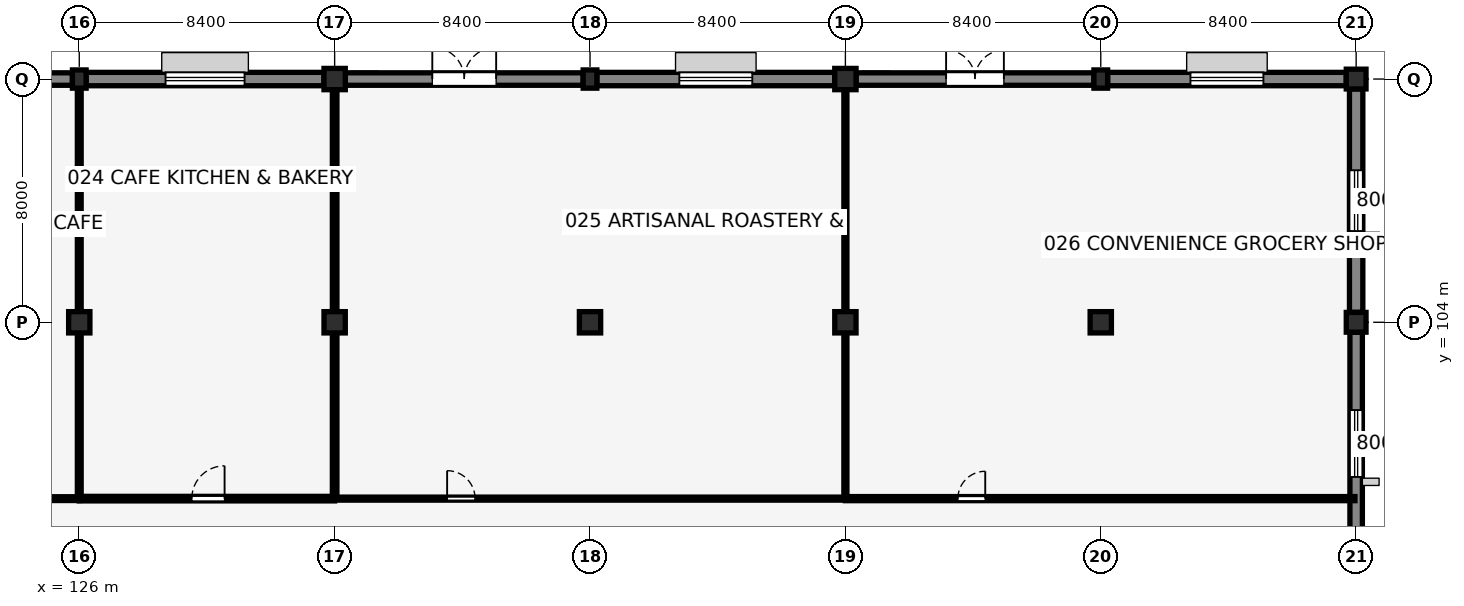
"""IFC4 building model, lengths in metres.
Left out: names, types, materials, properties, quantities, classifications, styles, units other than length and angle.
Written with IfcOpenShell. Run it as: python <this file> out.ifc"""

import sys

from ifc_helpers import new_model, si_unit, direction, frame, frame_2d, origin, origin_2d, place, context, subcontext, project, spatial, rectangle, extrude, element, fill, save


model = new_model("IFC4")
c1 = context("Model", 3, precision=1e-05, world=origin(), true_north=direction((0.0, 1.0)))
c2 = subcontext(c1, "Body", "Model", "MODEL_VIEW")
j1 = project(units=[si_unit("LENGTHUNIT", "METRE"), si_unit("PLANEANGLEUNIT", "RADIAN")], contexts=[c1])
p1 = place(None, origin())
s1 = spatial("IfcSite", under=j1, at=p1, CompositionType="ELEMENT")
p2 = place(p1, origin())
s2 = spatial("IfcBuilding", under=s1, at=p2, CompositionType="ELEMENT")
p3 = place(p2, origin())
s3 = spatial("IfcBuildingStorey", under=s2, at=p3, CompositionType="ELEMENT", Elevation=0.0)
p4 = place(p3, frame((126.0, 104.0, 0.0), z_axis=(0.0, 0.0, 1.0), x_axis=(1.0, 0.0, 0.0)))
e1 = element("IfcColumn", 1, at=p4, inside=s3, PredefinedType="COLUMN", context=c2, shape_type="SweptSolid", body=[
    extrude(rectangle(XDim=0.7, YDim=0.7, at=origin_2d()), origin(), (0.0, 0.0, 1.0), 5.15),
])
p5 = place(p3, frame((126.0, 112.0, 0.0), z_axis=(0.0, 0.0, 1.0), x_axis=(1.0, 0.0, 0.0)))
e2 = element("IfcColumn", 2, at=p5, inside=s3, PredefinedType="PILASTER", context=c2, shape_type="SweptSolid", body=[
    extrude(rectangle(XDim=0.45, YDim=0.6, at=origin_2d()), origin(), (0.0, 0.0, 1.0), 5.15),
])
for number, where, z_axis, x_axis in (
    (3, (134.4, 104.0, 0.0), (0.0, 0.0, 1.0), (1.0, 0.0, 0.0)),
    (4, (134.4, 112.0, 0.0), (0.0, 0.0, 1.0), (1.0, 0.0, 0.0)),
    (5, (142.8, 104.0, 0.0), (0.0, 0.0, 1.0), (1.0, 0.0, 0.0)),
):
    element("IfcColumn", number, at=place(p3, frame(where, z_axis=z_axis, x_axis=x_axis)), inside=s3, PredefinedType="COLUMN", context=c2, shape_type="SweptSolid", body=[
        extrude(rectangle(XDim=0.7, YDim=0.7, at=origin_2d()), origin(), (0.0, 0.0, 1.0), 5.15),
    ])
p6 = place(p3, frame((142.8, 112.0, 0.0), z_axis=(0.0, 0.0, 1.0), x_axis=(1.0, 0.0, 0.0)))
e6 = element("IfcColumn", 6, at=p6, inside=s3, PredefinedType="PILASTER", context=c2, shape_type="SweptSolid", body=[
    extrude(rectangle(XDim=0.45, YDim=0.6, at=origin_2d()), origin(), (0.0, 0.0, 1.0), 5.15),
])
for number, where, z_axis, x_axis in (
    (7, (151.2, 104.0, 0.0), (0.0, 0.0, 1.0), (1.0, 0.0, 0.0)),
    (8, (151.2, 112.0, 0.0), (0.0, 0.0, 1.0), (1.0, 0.0, 0.0)),
    (9, (159.6, 104.0, 0.0), (0.0, 0.0, 1.0), (1.0, 0.0, 0.0)),
):
    element("IfcColumn", number, at=place(p3, frame(where, z_axis=z_axis, x_axis=x_axis)), inside=s3, PredefinedType="COLUMN", context=c2, shape_type="SweptSolid", body=[
        extrude(rectangle(XDim=0.7, YDim=0.7, at=origin_2d()), origin(), (0.0, 0.0, 1.0), 5.15),
    ])
p7 = place(p3, frame((159.6, 112.0, 0.0), z_axis=(0.0, 0.0, 1.0), x_axis=(1.0, 0.0, 0.0)))
e10 = element("IfcColumn", 10, at=p7, inside=s3, PredefinedType="PILASTER", context=c2, shape_type="SweptSolid", body=[
    extrude(rectangle(XDim=0.45, YDim=0.6, at=origin_2d()), origin(), (0.0, 0.0, 1.0), 5.15),
])
for number, where, z_axis, x_axis in (
    (11, (168.0, 104.0, 0.0), (0.0, 0.0, 1.0), (1.0, 0.0, 0.0)),
    (12, (168.0, 112.0, 0.0), (0.0, 0.0, 1.0), (1.0, 0.0, 0.0)),
):
    element("IfcColumn", number, at=place(p3, frame(where, z_axis=z_axis, x_axis=x_axis)), inside=s3, PredefinedType="COLUMN", context=c2, shape_type="SweptSolid", body=[
        extrude(rectangle(XDim=0.65, YDim=0.65, at=origin_2d()), origin(), (0.0, 0.0, 1.0), 5.15),
    ])
p8 = place(p3, frame((117.95, 112.0, 0.0), z_axis=(0.0, 0.0, 1.0), x_axis=(1.0, 0.0, 0.0)))
e13 = element("IfcWall", 13, at=p8, inside=s3, PredefinedType="SOLIDWALL", context=c2, shape_type="SweptSolid", body=[
    extrude(rectangle(XDim=7.825, YDim=0.41, at=frame_2d((3.913, 0.0))), origin(), (0.0, 0.0, 1.0), 4.74),
])
p9 = place(p8, frame((2.512, 0.0, 0.9), z_axis=(0.0, 0.0, 1.0), x_axis=(1.0, 0.0, 0.0)))
e14 = element("IfcOpeningElement", 14, at=p9, cuts=e13, PredefinedType="OPENING", context=c2, shape_type="SweptSolid", body=[
    extrude(rectangle(XDim=2.8, YDim=1.6, at=frame_2d((1.4, 0.8))), frame((0.0, 0.215, 0.0), z_axis=(0.0, -1.0, 0.0), x_axis=(1.0, 0.0, 0.0)), (0.0, 0.0, 1.0), 0.43),
])
p10 = place(p3, frame((126.225, 112.0, 0.0), z_axis=(0.0, 0.0, 1.0), x_axis=(1.0, 0.0, 0.0)))
e15 = element("IfcWall", 15, at=p10, inside=s3, PredefinedType="SOLIDWALL", context=c2, shape_type="SweptSolid", body=[
    extrude(rectangle(XDim=7.825, YDim=0.44, at=frame_2d((3.913, 0.0))), origin(), (0.0, 0.0, 1.0), 4.74),
])
p11 = place(p10, frame((2.613, 0.0, 0.9), z_axis=(0.0, 0.0, 1.0), x_axis=(1.0, 0.0, 0.0)))
e16 = element("IfcOpeningElement", 16, at=p11, cuts=e15, PredefinedType="OPENING", context=c2, shape_type="SweptSolid", body=[
    extrude(rectangle(XDim=2.6, YDim=1.8, at=frame_2d((1.3, 0.9))), frame((0.0, 0.23, 0.0), z_axis=(0.0, -1.0, 0.0), x_axis=(1.0, 0.0, 0.0)), (0.0, 0.0, 1.0), 0.46),
])
p12 = place(p3, frame((134.75, 112.0, 0.0), z_axis=(0.0, 0.0, 1.0), x_axis=(1.0, 0.0, 0.0)))
e17 = element("IfcWall", 17, at=p12, inside=s3, PredefinedType="SOLIDWALL", context=c2, shape_type="SweptSolid", body=[
    extrude(rectangle(XDim=7.825, YDim=0.41, at=frame_2d((3.913, 0.0))), origin(), (0.0, 0.0, 1.0), 4.74),
])
p13 = place(p12, frame((2.863, 0.0, 0.0), z_axis=(0.0, 0.0, 1.0), x_axis=(1.0, 0.0, 0.0)))
e18 = element("IfcOpeningElement", 18, at=p13, cuts=e17, PredefinedType="OPENING", context=c2, shape_type="SweptSolid", body=[
    extrude(rectangle(XDim=2.1, YDim=2.45, at=frame_2d((1.05, 1.225))), frame((0.0, 0.215, 0.0), z_axis=(0.0, -1.0, 0.0), x_axis=(1.0, 0.0, 0.0)), (0.0, 0.0, 1.0), 0.43),
])
p14 = place(p3, frame((143.025, 112.0, 0.0), z_axis=(0.0, 0.0, 1.0), x_axis=(1.0, 0.0, 0.0)))
e19 = element("IfcWall", 19, at=p14, inside=s3, PredefinedType="SOLIDWALL", context=c2, shape_type="SweptSolid", body=[
    extrude(rectangle(XDim=7.825, YDim=0.44, at=frame_2d((3.913, 0.0))), origin(), (0.0, 0.0, 1.0), 4.74),
])
p15 = place(p14, frame((2.712, 0.0, 0.9), z_axis=(0.0, 0.0, 1.0), x_axis=(1.0, 0.0, 0.0)))
e20 = element("IfcOpeningElement", 20, at=p15, cuts=e19, PredefinedType="OPENING", context=c2, shape_type="SweptSolid", body=[
    extrude(rectangle(XDim=2.4, YDim=1.75, at=frame_2d((1.2, 0.875))), frame((0.0, 0.23, 0.0), z_axis=(0.0, -1.0, 0.0), x_axis=(1.0, 0.0, 0.0)), (0.0, 0.0, 1.0), 0.46),
])
p16 = place(p3, frame((151.55, 112.0, 0.0), z_axis=(0.0, 0.0, 1.0), x_axis=(1.0, 0.0, 0.0)))
e21 = element("IfcWall", 21, at=p16, inside=s3, PredefinedType="SOLIDWALL", context=c2, shape_type="SweptSolid", body=[
    extrude(rectangle(XDim=7.825, YDim=0.41, at=frame_2d((3.913, 0.0))), origin(), (0.0, 0.0, 1.0), 4.74),
])
p17 = place(p16, frame((2.962, 0.0, 0.0), z_axis=(0.0, 0.0, 1.0), x_axis=(1.0, 0.0, 0.0)))
e22 = element("IfcOpeningElement", 22, at=p17, cuts=e21, PredefinedType="OPENING", context=c2, shape_type="SweptSolid", body=[
    extrude(rectangle(XDim=1.9, YDim=2.35, at=frame_2d((0.95, 1.175))), frame((0.0, 0.215, 0.0), z_axis=(0.0, -1.0, 0.0), x_axis=(1.0, 0.0, 0.0)), (0.0, 0.0, 1.0), 0.43),
])
p18 = place(p3, frame((159.825, 112.0, 0.0), z_axis=(0.0, 0.0, 1.0), x_axis=(1.0, 0.0, 0.0)))
e23 = element("IfcWall", 23, at=p18, inside=s3, PredefinedType="SOLIDWALL", context=c2, shape_type="SweptSolid", body=[
    extrude(rectangle(XDim=7.85, YDim=0.44, at=frame_2d((3.925, 0.0))), origin(), (0.0, 0.0, 1.0), 4.74),
])
p19 = place(p18, frame((2.725, 0.0, 0.9), z_axis=(0.0, 0.0, 1.0), x_axis=(1.0, 0.0, 0.0)))
e24 = element("IfcOpeningElement", 24, at=p19, cuts=e23, PredefinedType="OPENING", context=c2, shape_type="SweptSolid", body=[
    extrude(rectangle(XDim=2.4, YDim=1.5, at=frame_2d((1.2, 0.75))), frame((0.0, 0.23, 0.0), z_axis=(0.0, -1.0, 0.0), x_axis=(1.0, 0.0, 0.0)), (0.0, 0.0, 1.0), 0.46),
])
p20 = place(p3, frame((168.0, 96.35, 0.0), z_axis=(0.0, 0.0, 1.0), x_axis=(0.0, 1.0, 0.0)))
e25 = element("IfcWall", 25, at=p20, inside=s3, PredefinedType="SOLIDWALL", context=c2, shape_type="SweptSolid", body=[
    extrude(rectangle(XDim=7.325, YDim=0.41, at=frame_2d((3.663, 0.0))), origin(), (0.0, 0.0, 1.0), 4.747),
])
p21 = place(p20, frame((2.562, 0.0, 0.9), z_axis=(0.0, 0.0, 1.0), x_axis=(1.0, 0.0, 0.0)))
e26 = element("IfcOpeningElement", 26, at=p21, cuts=e25, PredefinedType="OPENING", context=c2, shape_type="SweptSolid", body=[
    extrude(rectangle(XDim=2.2, YDim=1.5, at=frame_2d((1.1, 0.75))), frame((0.0, 0.215, 0.0), z_axis=(0.0, -1.0, 0.0), x_axis=(1.0, 0.0, 0.0)), (0.0, 0.0, 1.0), 0.43),
])
p22 = place(p3, frame((168.0, 104.325, 0.0), z_axis=(0.0, 0.0, 1.0), x_axis=(0.0, 1.0, 0.0)))
e27 = element("IfcWall", 27, at=p22, inside=s3, PredefinedType="SOLIDWALL", context=c2, shape_type="SweptSolid", body=[
    extrude(rectangle(XDim=7.35, YDim=0.44, at=frame_2d((3.675, 0.0))), origin(), (0.0, 0.0, 1.0), 4.747),
])
p23 = place(p22, frame((2.675, 0.0, 0.9), z_axis=(0.0, 0.0, 1.0), x_axis=(1.0, 0.0, 0.0)))
e28 = element("IfcOpeningElement", 28, at=p23, cuts=e27, PredefinedType="OPENING", context=c2, shape_type="SweptSolid", body=[
    extrude(rectangle(XDim=2.0, YDim=1.5, at=frame_2d((1.0, 0.75))), frame((0.0, 0.23, 0.0), z_axis=(0.0, -1.0, 0.0), x_axis=(1.0, 0.0, 0.0)), (0.0, 0.0, 1.0), 0.46),
])
p24 = place(p3, frame((100.84, 98.2, 0.0), z_axis=(0.0, 0.0, 1.0), x_axis=(1.0, 0.0, 0.0)))
e29 = element("IfcWall", 29, at=p24, inside=s3, PredefinedType="PARTITIONING", context=c2, shape_type="SweptSolid", body=[
    extrude(rectangle(XDim=25.16, YDim=0.125, at=frame_2d((12.58, 0.0))), origin(), (0.0, 0.0, 1.0), 5.15),
])
p25 = place(p24, frame((3.66, 0.0, 0.0), z_axis=(0.0, 0.0, 1.0), x_axis=(1.0, 0.0, 0.0)))
e30 = element("IfcOpeningElement", 30, at=p25, cuts=e29, PredefinedType="OPENING", context=c2, shape_type="SweptSolid", body=[
    extrude(rectangle(XDim=0.98, YDim=2.15, at=frame_2d((0.49, 1.075))), frame((0.0, 0.073, 0.0), z_axis=(0.0, -1.0, 0.0), x_axis=(1.0, 0.0, 0.0)), (0.0, 0.0, 1.0), 0.145),
])
p26 = place(p3, frame((126.0, 98.2, 0.0), z_axis=(0.0, 0.0, 1.0), x_axis=(1.0, 0.0, 0.0)))
e31 = element("IfcWall", 31, at=p26, inside=s3, PredefinedType="PARTITIONING", context=c2, shape_type="SweptSolid", body=[
    extrude(rectangle(XDim=8.4, YDim=0.15, at=frame_2d((4.2, 0.0))), origin(), (0.0, 0.0, 1.0), 5.15),
])
p27 = place(p26, frame((3.7, 0.0, 0.0), z_axis=(0.0, 0.0, 1.0), x_axis=(1.0, 0.0, 0.0)))
e32 = element("IfcOpeningElement", 32, at=p27, cuts=e31, PredefinedType="OPENING", context=c2, shape_type="SweptSolid", body=[
    extrude(rectangle(XDim=1.08, YDim=2.18, at=frame_2d((0.54, 1.09))), frame((0.0, 0.085, 0.0), z_axis=(0.0, -1.0, 0.0), x_axis=(1.0, 0.0, 0.0)), (0.0, 0.0, 1.0), 0.17),
])
p28 = place(p3, frame((134.4, 98.2, 0.0), z_axis=(0.0, 0.0, 1.0), x_axis=(1.0, 0.0, 0.0)))
e33 = element("IfcWall", 33, at=p28, inside=s3, PredefinedType="PARTITIONING", context=c2, shape_type="SweptSolid", body=[
    extrude(rectangle(XDim=16.8, YDim=0.1, at=frame_2d((8.4, 0.0))), origin(), (0.0, 0.0, 1.0), 4.542),
])
p29 = place(p28, frame((3.7, 0.0, 0.0), z_axis=(0.0, 0.0, 1.0), x_axis=(1.0, 0.0, 0.0)))
e34 = element("IfcOpeningElement", 34, at=p29, cuts=e33, PredefinedType="OPENING", context=c2, shape_type="SweptSolid", body=[
    extrude(rectangle(XDim=0.92, YDim=2.12, at=frame_2d((0.46, 1.06))), frame((0.0, 0.06, 0.0), z_axis=(0.0, -1.0, 0.0), x_axis=(1.0, 0.0, 0.0)), (0.0, 0.0, 1.0), 0.12),
])
p30 = place(p3, frame((151.2, 98.2, 0.0), z_axis=(0.0, 0.0, 1.0), x_axis=(1.0, 0.0, 0.0)))
e35 = element("IfcWall", 35, at=p30, inside=s3, PredefinedType="PARTITIONING", context=c2, shape_type="SweptSolid", body=[
    extrude(rectangle(XDim=16.76, YDim=0.135, at=frame_2d((8.38, 0.0))), origin(), (0.0, 0.0, 1.0), 4.542),
])
p31 = place(p30, frame((3.7, 0.0, 0.0), z_axis=(0.0, 0.0, 1.0), x_axis=(1.0, 0.0, 0.0)))
e36 = element("IfcOpeningElement", 36, at=p31, cuts=e35, PredefinedType="OPENING", context=c2, shape_type="SweptSolid", body=[
    extrude(rectangle(XDim=0.9, YDim=2.1, at=frame_2d((0.45, 1.05))), frame((0.0, 0.077, 0.0), z_axis=(0.0, -1.0, 0.0), x_axis=(1.0, 0.0, 0.0)), (0.0, 0.0, 1.0), 0.155),
])
p32 = place(p3, frame((126.0, 98.2, 0.0), z_axis=(0.0, 0.0, 1.0), x_axis=(0.0, 1.0, 0.0)))
e37 = element("IfcWall", 37, at=p32, inside=s3, PredefinedType="PARTITIONING", context=c2, shape_type="SweptSolid", body=[
    extrude(rectangle(XDim=5.46, YDim=0.125, at=frame_2d((2.73, 0.0))), origin(), (0.0, 0.0, 1.0), 4.542),
])
p33 = place(p3, frame((126.0, 104.34, 0.0), z_axis=(0.0, 0.0, 1.0), x_axis=(0.0, 1.0, 0.0)))
e38 = element("IfcWall", 38, at=p33, inside=s3, PredefinedType="PARTITIONING", context=c2, shape_type="SweptSolid", body=[
    extrude(rectangle(XDim=7.37, YDim=0.125, at=frame_2d((3.685, 0.0))), origin(), (0.0, 0.0, 1.0), 4.542),
])
p34 = place(p3, frame((134.4, 98.2, 0.0), z_axis=(0.0, 0.0, 1.0), x_axis=(0.0, 1.0, 0.0)))
e39 = element("IfcWall", 39, at=p34, inside=s3, PredefinedType="PARTITIONING", context=c2, shape_type="SweptSolid", body=[
    extrude(rectangle(XDim=5.46, YDim=0.15, at=frame_2d((2.73, 0.0))), origin(), (0.0, 0.0, 1.0), 4.542),
])
p35 = place(p3, frame((134.4, 104.34, 0.0), z_axis=(0.0, 0.0, 1.0), x_axis=(0.0, 1.0, 0.0)))
e40 = element("IfcWall", 40, at=p35, inside=s3, PredefinedType="PARTITIONING", context=c2, shape_type="SweptSolid", body=[
    extrude(rectangle(XDim=7.32, YDim=0.15, at=frame_2d((3.66, 0.0))), origin(), (0.0, 0.0, 1.0), 4.542),
])
p36 = place(p3, frame((151.2, 98.2, 0.0), z_axis=(0.0, 0.0, 1.0), x_axis=(0.0, 1.0, 0.0)))
e41 = element("IfcWall", 41, at=p36, inside=s3, PredefinedType="PARTITIONING", context=c2, shape_type="SweptSolid", body=[
    extrude(rectangle(XDim=5.46, YDim=0.1, at=frame_2d((2.73, 0.0))), origin(), (0.0, 0.0, 1.0), 4.542),
])
p37 = place(p3, frame((151.2, 104.34, 0.0), z_axis=(0.0, 0.0, 1.0), x_axis=(0.0, 1.0, 0.0)))
e42 = element("IfcWall", 42, at=p37, inside=s3, PredefinedType="PARTITIONING", context=c2, shape_type="SweptSolid", body=[
    extrude(rectangle(XDim=7.32, YDim=0.1, at=frame_2d((3.66, 0.0))), origin(), (0.0, 0.0, 1.0), 4.542),
])
p38 = place(p11, origin())
e43 = element("IfcWindow", 43, at=p38, inside=s3, PartitioningType="DOUBLE_PANEL_VERTICAL", PredefinedType="WINDOW", context=c2, shape_type="SweptSolid", body=[
    extrude(rectangle(XDim=2.6, YDim=1.8, at=frame_2d((1.3, 0.9))), frame((0.0, 0.03, 0.0), z_axis=(0.0, -1.0, 0.0), x_axis=(1.0, 0.0, 0.0)), (0.0, 0.0, 1.0), 0.06),
])
fill(e16, e43)
p39 = place(p13, origin())
e44 = element("IfcDoor", 44, at=p39, inside=s3, OperationType="DOUBLE_DOOR_SINGLE_SWING", PredefinedType="DOOR", context=c2, shape_type="SweptSolid", body=[
    extrude(rectangle(XDim=2.1, YDim=2.45, at=frame_2d((1.05, 1.225))), frame((0.0, 0.025, 0.0), z_axis=(0.0, -1.0, 0.0), x_axis=(1.0, 0.0, 0.0)), (0.0, 0.0, 1.0), 0.05),
])
fill(e18, e44)
p40 = place(p15, origin())
e45 = element("IfcWindow", 45, at=p40, inside=s3, PartitioningType="DOUBLE_PANEL_VERTICAL", PredefinedType="WINDOW", context=c2, shape_type="SweptSolid", body=[
    extrude(rectangle(XDim=2.4, YDim=1.75, at=frame_2d((1.2, 0.875))), frame((0.0, 0.03, 0.0), z_axis=(0.0, -1.0, 0.0), x_axis=(1.0, 0.0, 0.0)), (0.0, 0.0, 1.0), 0.06),
])
fill(e20, e45)
p41 = place(p17, origin())
e46 = element("IfcDoor", 46, at=p41, inside=s3, OperationType="DOUBLE_DOOR_SINGLE_SWING", PredefinedType="DOOR", context=c2, shape_type="SweptSolid", body=[
    extrude(rectangle(XDim=1.9, YDim=2.35, at=frame_2d((0.95, 1.175))), frame((0.0, 0.025, 0.0), z_axis=(0.0, -1.0, 0.0), x_axis=(1.0, 0.0, 0.0)), (0.0, 0.0, 1.0), 0.05),
])
fill(e22, e46)
p42 = place(p19, origin())
e47 = element("IfcWindow", 47, at=p42, inside=s3, PartitioningType="DOUBLE_PANEL_VERTICAL", PredefinedType="WINDOW", context=c2, shape_type="SweptSolid", body=[
    extrude(rectangle(XDim=2.4, YDim=1.5, at=frame_2d((1.2, 0.75))), frame((0.0, 0.03, 0.0), z_axis=(0.0, -1.0, 0.0), x_axis=(1.0, 0.0, 0.0)), (0.0, 0.0, 1.0), 0.06),
])
fill(e24, e47)
p43 = place(p21, origin())
e48 = element("IfcWindow", 48, at=p43, inside=s3, PartitioningType="DOUBLE_PANEL_VERTICAL", PredefinedType="WINDOW", context=c2, shape_type="SweptSolid", body=[
    extrude(rectangle(XDim=2.2, YDim=1.5, at=frame_2d((1.1, 0.75))), frame((0.0, 0.03, 0.0), z_axis=(0.0, -1.0, 0.0), x_axis=(1.0, 0.0, 0.0)), (0.0, 0.0, 1.0), 0.06),
])
fill(e26, e48)
p44 = place(p23, origin())
e49 = element("IfcWindow", 49, at=p44, inside=s3, PartitioningType="DOUBLE_PANEL_VERTICAL", PredefinedType="WINDOW", context=c2, shape_type="SweptSolid", body=[
    extrude(rectangle(XDim=2.0, YDim=1.5, at=frame_2d((1.0, 0.75))), frame((0.0, 0.03, 0.0), z_axis=(0.0, -1.0, 0.0), x_axis=(1.0, 0.0, 0.0)), (0.0, 0.0, 1.0), 0.06),
])
fill(e28, e49)
p45 = place(p27, origin())
e50 = element("IfcDoor", 50, at=p45, inside=s3, OperationType="SINGLE_SWING_RIGHT", PredefinedType="DOOR", context=c2, shape_type="SweptSolid", body=[
    extrude(rectangle(XDim=1.08, YDim=2.18, at=frame_2d((0.54, 1.09))), frame((0.0, 0.025, 0.0), z_axis=(0.0, -1.0, 0.0), x_axis=(1.0, 0.0, 0.0)), (0.0, 0.0, 1.0), 0.05),
])
fill(e32, e50)
p46 = place(p29, origin())
e51 = element("IfcDoor", 51, at=p46, inside=s3, OperationType="SINGLE_SWING_LEFT", PredefinedType="DOOR", context=c2, shape_type="SweptSolid", body=[
    extrude(rectangle(XDim=0.92, YDim=2.12, at=frame_2d((0.46, 1.06))), frame((0.0, 0.025, 0.0), z_axis=(0.0, -1.0, 0.0), x_axis=(1.0, 0.0, 0.0)), (0.0, 0.0, 1.0), 0.05),
])
fill(e34, e51)
p47 = place(p31, origin())
e52 = element("IfcDoor", 52, at=p47, inside=s3, OperationType="SINGLE_SWING_RIGHT", PredefinedType="DOOR", context=c2, shape_type="SweptSolid", body=[
    extrude(rectangle(XDim=0.9, YDim=2.1, at=frame_2d((0.45, 1.05))), frame((0.0, 0.025, 0.0), z_axis=(0.0, -1.0, 0.0), x_axis=(1.0, 0.0, 0.0)), (0.0, 0.0, 1.0), 0.05),
])
fill(e36, e52)
save(model, sys.argv[1])
